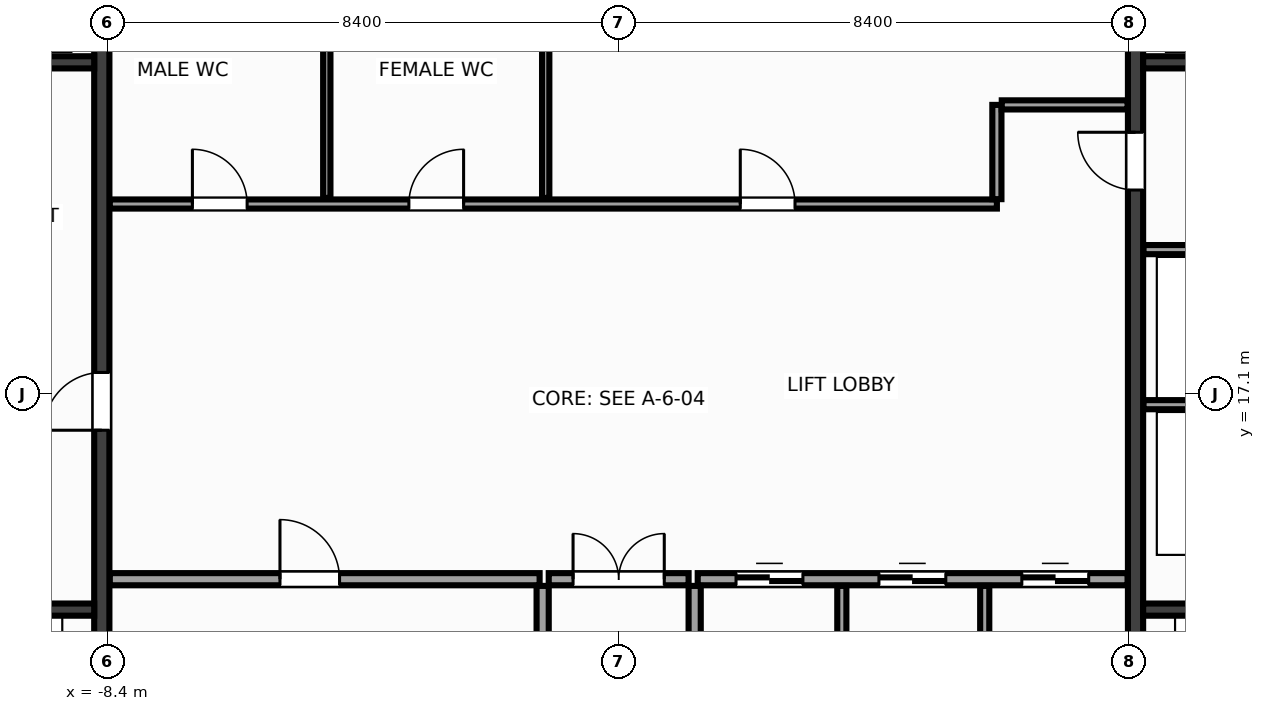
"""IFC4 building model, lengths in metres.
Left out: names, types, materials, properties, quantities, classifications, styles, units other than length and angle.
Written with IfcOpenShell. Run it as: python <this file> out.ifc"""

import sys

from ifc_helpers import new_model, si_unit, direction, frame, frame_2d, origin, place, context, subcontext, project, spatial, rectangle, extrude, source, transform, mapped, element, fill, save


model = new_model("IFC4")
c1 = context("Model", 3, precision=1e-05, world=origin(), true_north=direction((0.0, 1.0)))
c2 = subcontext(c1, "Body", "Model", "MODEL_VIEW")
j1 = project(units=[si_unit("LENGTHUNIT", "METRE"), si_unit("PLANEANGLEUNIT", "RADIAN")], contexts=[c1])
p1 = place(None, origin())
s1 = spatial("IfcSite", under=j1, at=p1, CompositionType="ELEMENT")
p2 = place(p1, origin())
s2 = spatial("IfcBuilding", under=s1, at=p2, CompositionType="ELEMENT")
p3 = place(p2, frame((0.0, 0.0, 110.0)))
s3 = spatial("IfcBuildingStorey", under=s2, at=p3, CompositionType="ELEMENT", Elevation=110.0)
m1 = source(origin(), c2, "Body", "SweptSolid", [
    extrude(rectangle(XDim=12.95, YDim=0.25, at=frame_2d((6.475, 0.0))), origin(), (0.0, 0.0, 1.0), 3.6),
])
p4 = place(p3, frame((-8.5, 10.525, 0.0), z_axis=(0.0, 0.0, 1.0), x_axis=(0.0, 1.0, 0.0)))
e1 = element("IfcWall", 1, at=p4, inside=s3, PredefinedType="SHEAR", context=c2, shape_type="MappedRepresentation", body=[
    mapped(m1, transform((0.0, 0.0, 0.0), x_axis=(1.0, 0.0, 0.0), y_axis=(0.0, 1.0, 0.0), z_axis=(0.0, 0.0, 1.0), scale=1.0)),
])
p5 = place(p4, frame((5.975, 0.0, 0.0)))
e2 = element("IfcOpeningElement", 2, at=p5, cuts=e1, PredefinedType="OPENING", context=c2, shape_type="SweptSolid", body=[
    extrude(rectangle(XDim=0.95, YDim=2.15, at=frame_2d((0.475, 1.075))), frame((0.0, 0.137, 0.0), z_axis=(0.0, -1.0, 0.0), x_axis=(1.0, 0.0, 0.0)), (0.0, 0.0, 1.0), 0.274),
])
p6 = place(p3, frame((8.5, 10.525, 0.0), z_axis=(0.0, 0.0, 1.0), x_axis=(0.0, 1.0, 0.0)))
e3 = element("IfcWall", 3, at=p6, inside=s3, PredefinedType="SHEAR", context=c2, shape_type="MappedRepresentation", body=[
    mapped(m1, transform((0.0, 0.0, 0.0), x_axis=(1.0, 0.0, 0.0), y_axis=(0.0, 1.0, 0.0), z_axis=(0.0, 0.0, 1.0), scale=1.0)),
])
p7 = place(p6, frame((9.925, 0.0, 0.0)))
e4 = element("IfcOpeningElement", 4, at=p7, cuts=e3, PredefinedType="OPENING", context=c2, shape_type="SweptSolid", body=[
    extrude(rectangle(XDim=0.95, YDim=2.15, at=frame_2d((0.475, 1.075))), frame((0.0, 0.137, 0.0), z_axis=(0.0, -1.0, 0.0), x_axis=(1.0, 0.0, 0.0)), (0.0, 0.0, 1.0), 0.274),
])
m2 = source(origin(), c2, "Body", "SweptSolid", [
    extrude(rectangle(XDim=2.825, YDim=0.2, at=frame_2d((1.413, 0.0))), origin(), (0.0, 0.0, 1.0), 3.6),
])
for number, where, z_axis, x_axis in (
    (5, (-11.45, 13.55, 0.0), (0.0, 0.0, 1.0), (1.0, 0.0, 0.0)),
    (6, (8.625, 13.55, 0.0), (0.0, 0.0, 1.0), (1.0, 0.0, 0.0)),
):
    element("IfcWall", number, at=place(p3, frame(where, z_axis=z_axis, x_axis=x_axis)), inside=s3, PredefinedType="SHEAR", context=c2, shape_type="MappedRepresentation", body=[
        mapped(m2, transform((0.0, 0.0, 0.0), x_axis=(1.0, 0.0, 0.0), y_axis=(0.0, 1.0, 0.0), z_axis=(0.0, 0.0, 1.0), scale=1.0)),
    ])
m3 = source(origin(), c2, "Body", "SweptSolid", [
    extrude(rectangle(XDim=3.02, YDim=0.2, at=frame_2d((1.51, 0.0))), origin(), (0.0, 0.0, 1.0), 3.6),
])
for number, where, z_axis, x_axis in (
    (7, (-11.645, 22.55, 0.0), (0.0, 0.0, 1.0), (1.0, 0.0, 0.0)),
    (8, (8.625, 22.55, 0.0), (0.0, 0.0, 1.0), (1.0, 0.0, 0.0)),
):
    element("IfcWall", number, at=place(p3, frame(where, z_axis=z_axis, x_axis=x_axis)), inside=s3, PredefinedType="SHEAR", context=c2, shape_type="MappedRepresentation", body=[
        mapped(m3, transform((0.0, 0.0, 0.0), x_axis=(1.0, 0.0, 0.0), y_axis=(0.0, 1.0, 0.0), z_axis=(0.0, 0.0, 1.0), scale=1.0)),
    ])
m4 = source(origin(), c2, "Body", "SweptSolid", [
    extrude(rectangle(XDim=3.01, YDim=0.15, at=frame_2d((1.505, 0.0))), origin(), (0.0, 0.0, 1.0), 3.36),
])
for number, where, z_axis, x_axis in (
    (9, (8.63, 16.92, 0.0), (0.0, 0.0, 1.0), (1.0, 0.0, 0.0)),
    (10, (8.63, 19.47, 0.0), (0.0, 0.0, 1.0), (1.0, 0.0, 0.0)),
):
    element("IfcWall", number, at=place(p3, frame(where, z_axis=z_axis, x_axis=x_axis)), inside=s3, PredefinedType="PARTITIONING", context=c2, shape_type="MappedRepresentation", body=[
        mapped(m4, transform((0.0, 0.0, 0.0), x_axis=(1.0, 0.0, 0.0), y_axis=(0.0, 1.0, 0.0), z_axis=(0.0, 0.0, 1.0), scale=1.0)),
    ])
m5 = source(origin(), c2, "Body", "SweptSolid", [
    extrude(rectangle(XDim=7.07, YDim=0.2, at=frame_2d((3.535, 0.0))), origin(), (0.0, 0.0, 1.0), 3.36),
])
p8 = place(p3, frame((-8.37, 14.05, 0.0), z_axis=(0.0, 0.0, 1.0), x_axis=(1.0, 0.0, 0.0)))
e11 = element("IfcWall", 11, at=p8, inside=s3, PredefinedType="PARTITIONING", context=c2, shape_type="MappedRepresentation", body=[
    mapped(m5, transform((0.0, 0.0, 0.0), x_axis=(1.0, 0.0, 0.0), y_axis=(0.0, 1.0, 0.0), z_axis=(0.0, 0.0, 1.0), scale=1.0)),
])
p9 = place(p8, frame((2.8, 0.0, 0.0)))
e12 = element("IfcOpeningElement", 12, at=p9, cuts=e11, PredefinedType="OPENING", context=c2, shape_type="SweptSolid", body=[
    extrude(rectangle(XDim=0.98, YDim=2.15, at=frame_2d((0.49, 1.075))), frame((0.0, 0.112, 0.0), z_axis=(0.0, -1.0, 0.0), x_axis=(1.0, 0.0, 0.0)), (0.0, 0.0, 1.0), 0.224),
])
p10 = place(p3, frame((1.3, 14.05, 0.0), z_axis=(0.0, 0.0, 1.0), x_axis=(1.0, 0.0, 0.0)))
e13 = element("IfcWall", 13, at=p10, inside=s3, PredefinedType="PARTITIONING", context=c2, shape_type="MappedRepresentation", body=[
    mapped(m5, transform((0.0, 0.0, 0.0), x_axis=(1.0, 0.0, 0.0), y_axis=(0.0, 1.0, 0.0), z_axis=(0.0, 0.0, 1.0), scale=1.0)),
])
p11 = place(p10, frame((0.63, 0.0, 0.0)))
e14 = element("IfcOpeningElement", 14, at=p11, cuts=e13, PredefinedType="OPENING", context=c2, shape_type="SweptSolid", body=[
    extrude(rectangle(XDim=1.1, YDim=2.15, at=frame_2d((0.55, 1.075))), frame((0.0, 0.112, 0.0), z_axis=(0.0, -1.0, 0.0), x_axis=(1.0, 0.0, 0.0)), (0.0, 0.0, 1.0), 0.224),
])
p12 = place(p10, frame((2.98, 0.0, 0.0)))
e15 = element("IfcOpeningElement", 15, at=p12, cuts=e13, PredefinedType="OPENING", context=c2, shape_type="SweptSolid", body=[
    extrude(rectangle(XDim=1.1, YDim=2.15, at=frame_2d((0.55, 1.075))), frame((0.0, 0.112, 0.0), z_axis=(0.0, -1.0, 0.0), x_axis=(1.0, 0.0, 0.0)), (0.0, 0.0, 1.0), 0.224),
])
p13 = place(p10, frame((5.33, 0.0, 0.0)))
e16 = element("IfcOpeningElement", 16, at=p13, cuts=e13, PredefinedType="OPENING", context=c2, shape_type="SweptSolid", body=[
    extrude(rectangle(XDim=1.1, YDim=2.15, at=frame_2d((0.55, 1.075))), frame((0.0, 0.112, 0.0), z_axis=(0.0, -1.0, 0.0), x_axis=(1.0, 0.0, 0.0)), (0.0, 0.0, 1.0), 0.224),
])
m6 = source(origin(), c2, "Body", "SweptSolid", [
    extrude(rectangle(XDim=3.415, YDim=0.2, at=frame_2d((1.708, 0.0))), origin(), (0.0, 0.0, 1.0), 3.36),
])
for number, where, z_axis, x_axis in (
    (17, (-1.25, 10.525, 0.0), (0.0, 0.0, 1.0), (0.0, 1.0, 0.0)),
    (18, (1.25, 10.525, 0.0), (0.0, 0.0, 1.0), (0.0, 1.0, 0.0)),
):
    element("IfcWall", number, at=place(p3, frame(where, z_axis=z_axis, x_axis=x_axis)), inside=s3, PredefinedType="PARTITIONING", context=c2, shape_type="MappedRepresentation", body=[
        mapped(m6, transform((0.0, 0.0, 0.0), x_axis=(1.0, 0.0, 0.0), y_axis=(0.0, 1.0, 0.0), z_axis=(0.0, 0.0, 1.0), scale=1.0)),
    ])
m7 = source(origin(), c2, "Body", "SweptSolid", [
    extrude(rectangle(XDim=2.3, YDim=0.2, at=frame_2d((1.15, 0.0))), origin(), (0.0, 0.0, 1.0), 3.36),
])
p14 = place(p3, frame((-1.15, 14.05, 0.0), z_axis=(0.0, 0.0, 1.0), x_axis=(1.0, 0.0, 0.0)))
e19 = element("IfcWall", 19, at=p14, inside=s3, PredefinedType="PARTITIONING", context=c2, shape_type="MappedRepresentation", body=[
    mapped(m7, transform((0.0, 0.0, 0.0), x_axis=(1.0, 0.0, 0.0), y_axis=(0.0, 1.0, 0.0), z_axis=(0.0, 0.0, 1.0), scale=1.0)),
])
p15 = place(p14, frame((0.4, 0.0, 0.0)))
e20 = element("IfcOpeningElement", 20, at=p15, cuts=e19, PredefinedType="OPENING", context=c2, shape_type="SweptSolid", body=[
    extrude(rectangle(XDim=1.5, YDim=2.2, at=frame_2d((0.75, 1.1))), frame((0.0, 0.112, 0.0), z_axis=(0.0, -1.0, 0.0), x_axis=(1.0, 0.0, 0.0)), (0.0, 0.0, 1.0), 0.224),
])
m8 = source(origin(), c2, "Body", "SweptSolid", [
    extrude(rectangle(XDim=14.59, YDim=0.15, at=frame_2d((7.295, 0.0))), origin(), (0.0, 0.0, 1.0), 3.36),
])
p16 = place(p3, frame((-8.37, 20.22, 0.0), z_axis=(0.0, 0.0, 1.0), x_axis=(1.0, 0.0, 0.0)))
e21 = element("IfcWall", 21, at=p16, inside=s3, PredefinedType="PARTITIONING", context=c2, shape_type="MappedRepresentation", body=[
    mapped(m8, transform((0.0, 0.0, 0.0), x_axis=(1.0, 0.0, 0.0), y_axis=(0.0, 1.0, 0.0), z_axis=(0.0, 0.0, 1.0), scale=1.0)),
])
p17 = place(p16, frame((1.36, 0.0, 0.0)))
e22 = element("IfcOpeningElement", 22, at=p17, cuts=e21, PredefinedType="OPENING", context=c2, shape_type="SweptSolid", body=[
    extrude(rectangle(XDim=0.9, YDim=2.15, at=frame_2d((0.45, 1.075))), frame((0.0, 0.087, 0.0), z_axis=(0.0, -1.0, 0.0), x_axis=(1.0, 0.0, 0.0)), (0.0, 0.0, 1.0), 0.174),
])
p18 = place(p16, frame((4.92, 0.0, 0.0)))
e23 = element("IfcOpeningElement", 23, at=p18, cuts=e21, PredefinedType="OPENING", context=c2, shape_type="SweptSolid", body=[
    extrude(rectangle(XDim=0.9, YDim=2.15, at=frame_2d((0.45, 1.075))), frame((0.0, 0.087, 0.0), z_axis=(0.0, -1.0, 0.0), x_axis=(1.0, 0.0, 0.0)), (0.0, 0.0, 1.0), 0.174),
])
p19 = place(p16, frame((10.37, 0.0, 0.0)))
e24 = element("IfcOpeningElement", 24, at=p19, cuts=e21, PredefinedType="OPENING", context=c2, shape_type="SweptSolid", body=[
    extrude(rectangle(XDim=0.9, YDim=2.15, at=frame_2d((0.45, 1.075))), frame((0.0, 0.087, 0.0), z_axis=(0.0, -1.0, 0.0), x_axis=(1.0, 0.0, 0.0)), (0.0, 0.0, 1.0), 0.174),
])
m9 = source(origin(), c2, "Body", "SweptSolid", [
    extrude(rectangle(XDim=1.55, YDim=0.15, at=frame_2d((0.775, 0.0))), origin(), (0.0, 0.0, 1.0), 3.36),
])
p20 = place(p3, frame((6.22, 20.3, 0.0), z_axis=(0.0, 0.0, 1.0), x_axis=(0.0, 1.0, 0.0)))
e25 = element("IfcWall", 25, at=p20, inside=s3, PredefinedType="PARTITIONING", context=c2, shape_type="MappedRepresentation", body=[
    mapped(m9, transform((0.0, 0.0, 0.0), x_axis=(1.0, 0.0, 0.0), y_axis=(0.0, 1.0, 0.0), z_axis=(0.0, 0.0, 1.0), scale=1.0)),
])
m10 = source(origin(), c2, "Body", "SweptSolid", [
    extrude(rectangle(XDim=2.07, YDim=0.15, at=frame_2d((1.035, 0.0))), origin(), (0.0, 0.0, 1.0), 3.36),
])
p21 = place(p3, frame((6.3, 21.85, 0.0), z_axis=(0.0, 0.0, 1.0), x_axis=(1.0, 0.0, 0.0)))
e26 = element("IfcWall", 26, at=p21, inside=s3, PredefinedType="PARTITIONING", context=c2, shape_type="MappedRepresentation", body=[
    mapped(m10, transform((0.0, 0.0, 0.0), x_axis=(1.0, 0.0, 0.0), y_axis=(0.0, 1.0, 0.0), z_axis=(0.0, 0.0, 1.0), scale=1.0)),
])
m11 = source(origin(), c2, "Body", "SweptSolid", [
    extrude(rectangle(XDim=3.415, YDim=0.15, at=frame_2d((1.708, 0.0))), origin(), (0.0, 0.0, 1.0), 3.36),
])
for number, where, z_axis, x_axis in (
    (27, (3.67, 10.525, 0.0), (0.0, 0.0, 1.0), (0.0, 1.0, 0.0)),
    (28, (6.02, 10.525, 0.0), (0.0, 0.0, 1.0), (0.0, 1.0, 0.0)),
):
    element("IfcWall", number, at=place(p3, frame(where, z_axis=z_axis, x_axis=x_axis)), inside=s3, PredefinedType="PARTITIONING", context=c2, shape_type="MappedRepresentation", body=[
        mapped(m11, transform((0.0, 0.0, 0.0), x_axis=(1.0, 0.0, 0.0), y_axis=(0.0, 1.0, 0.0), z_axis=(0.0, 0.0, 1.0), scale=1.0)),
    ])
m12 = source(origin(), c2, "Body", "SweptSolid", [
    extrude(rectangle(XDim=3.115, YDim=0.12, at=frame_2d((1.558, 0.0))), origin(), (0.0, 0.0, 1.0), 3.36),
])
for number, where, z_axis, x_axis in (
    (29, (-4.8, 20.32, 0.0), (0.0, 0.0, 1.0), (0.0, 1.0, 0.0)),
    (30, (-1.2, 20.32, 0.0), (0.0, 0.0, 1.0), (0.0, 1.0, 0.0)),
):
    element("IfcWall", number, at=place(p3, frame(where, z_axis=z_axis, x_axis=x_axis)), inside=s3, PredefinedType="PARTITIONING", context=c2, shape_type="MappedRepresentation", body=[
        mapped(m12, transform((0.0, 0.0, 0.0), x_axis=(1.0, 0.0, 0.0), y_axis=(0.0, 1.0, 0.0), z_axis=(0.0, 0.0, 1.0), scale=1.0)),
    ])
m13 = source(origin(), c2, "Body", "SweptSolid", [
    extrude(rectangle(XDim=0.95, YDim=2.15, at=frame_2d((0.475, 1.075))), frame((0.0, 0.025, 0.0), z_axis=(0.0, -1.0, 0.0), x_axis=(1.0, 0.0, 0.0)), (0.0, 0.0, 1.0), 0.05),
])
p22 = place(p5, origin())
e31 = element("IfcDoor", 31, at=p22, inside=s3, OperationType="SINGLE_SWING_LEFT", PredefinedType="DOOR", context=c2, shape_type="MappedRepresentation", body=[
    mapped(m13, transform((0.0, 0.0, 0.0), x_axis=(1.0, 0.0, 0.0), y_axis=(0.0, 1.0, 0.0), z_axis=(0.0, 0.0, 1.0), scale=1.0)),
])
fill(e2, e31)
m14 = source(origin(), c2, "Body", "SweptSolid", [
    extrude(rectangle(XDim=0.95, YDim=2.15, at=frame_2d((0.475, 1.075))), frame((0.0, 0.025, 0.0), z_axis=(0.0, -1.0, 0.0), x_axis=(1.0, 0.0, 0.0)), (0.0, 0.0, 1.0), 0.05),
])
p23 = place(p7, origin())
e32 = element("IfcDoor", 32, at=p23, inside=s3, OperationType="SINGLE_SWING_RIGHT", PredefinedType="DOOR", context=c2, shape_type="MappedRepresentation", body=[
    mapped(m14, transform((0.0, 0.0, 0.0), x_axis=(1.0, 0.0, 0.0), y_axis=(0.0, 1.0, 0.0), z_axis=(0.0, 0.0, 1.0), scale=1.0)),
])
fill(e4, e32)
m15 = source(origin(), c2, "Body", "SweptSolid", [
    extrude(rectangle(XDim=0.98, YDim=2.15, at=frame_2d((0.49, 1.075))), frame((0.0, 0.025, 0.0), z_axis=(0.0, -1.0, 0.0), x_axis=(1.0, 0.0, 0.0)), (0.0, 0.0, 1.0), 0.05),
])
p24 = place(p9, origin())
e33 = element("IfcDoor", 33, at=p24, inside=s3, OperationType="SINGLE_SWING_LEFT", PredefinedType="DOOR", context=c2, shape_type="MappedRepresentation", body=[
    mapped(m15, transform((0.0, 0.0, 0.0), x_axis=(1.0, 0.0, 0.0), y_axis=(0.0, 1.0, 0.0), z_axis=(0.0, 0.0, 1.0), scale=1.0)),
])
fill(e12, e33)
m16 = source(origin(), c2, "Body", "SweptSolid", [
    extrude(rectangle(XDim=1.1, YDim=2.15, at=frame_2d((0.55, 1.075))), frame((0.0, 0.025, 0.0), z_axis=(0.0, -1.0, 0.0), x_axis=(1.0, 0.0, 0.0)), (0.0, 0.0, 1.0), 0.05),
])
p25 = place(p11, origin())
e34 = element("IfcDoor", 34, at=p25, inside=s3, OperationType="DOUBLE_DOOR_SLIDING", PredefinedType="DOOR", context=c2, shape_type="MappedRepresentation", body=[
    mapped(m16, transform((0.0, 0.0, 0.0), x_axis=(1.0, 0.0, 0.0), y_axis=(0.0, 1.0, 0.0), z_axis=(0.0, 0.0, 1.0), scale=1.0)),
])
fill(e14, e34)
p26 = place(p12, origin())
e35 = element("IfcDoor", 35, at=p26, inside=s3, OperationType="DOUBLE_DOOR_SLIDING", PredefinedType="DOOR", context=c2, shape_type="MappedRepresentation", body=[
    mapped(m16, transform((0.0, 0.0, 0.0), x_axis=(1.0, 0.0, 0.0), y_axis=(0.0, 1.0, 0.0), z_axis=(0.0, 0.0, 1.0), scale=1.0)),
])
fill(e15, e35)
p27 = place(p13, origin())
e36 = element("IfcDoor", 36, at=p27, inside=s3, OperationType="DOUBLE_DOOR_SLIDING", PredefinedType="DOOR", context=c2, shape_type="MappedRepresentation", body=[
    mapped(m16, transform((0.0, 0.0, 0.0), x_axis=(1.0, 0.0, 0.0), y_axis=(0.0, 1.0, 0.0), z_axis=(0.0, 0.0, 1.0), scale=1.0)),
])
fill(e16, e36)
m17 = source(origin(), c2, "Body", "SweptSolid", [
    extrude(rectangle(XDim=1.5, YDim=2.2, at=frame_2d((0.75, 1.1))), frame((0.0, 0.025, 0.0), z_axis=(0.0, -1.0, 0.0), x_axis=(1.0, 0.0, 0.0)), (0.0, 0.0, 1.0), 0.05),
])
p28 = place(p15, origin())
e37 = element("IfcDoor", 37, at=p28, inside=s3, OperationType="DOUBLE_DOOR_SINGLE_SWING", PredefinedType="DOOR", context=c2, shape_type="MappedRepresentation", body=[
    mapped(m17, transform((0.0, 0.0, 0.0), x_axis=(1.0, 0.0, 0.0), y_axis=(0.0, 1.0, 0.0), z_axis=(0.0, 0.0, 1.0), scale=1.0)),
])
fill(e20, e37)
m18 = source(origin(), c2, "Body", "SweptSolid", [
    extrude(rectangle(XDim=0.9, YDim=2.15, at=frame_2d((0.45, 1.075))), frame((0.0, 0.025, 0.0), z_axis=(0.0, -1.0, 0.0), x_axis=(1.0, 0.0, 0.0)), (0.0, 0.0, 1.0), 0.05),
])
p29 = place(p17, origin())
e38 = element("IfcDoor", 38, at=p29, inside=s3, OperationType="SINGLE_SWING_LEFT", PredefinedType="DOOR", context=c2, shape_type="MappedRepresentation", body=[
    mapped(m18, transform((0.0, 0.0, 0.0), x_axis=(1.0, 0.0, 0.0), y_axis=(0.0, 1.0, 0.0), z_axis=(0.0, 0.0, 1.0), scale=1.0)),
])
fill(e22, e38)
p30 = place(p18, origin())
e39 = element("IfcDoor", 39, at=p30, inside=s3, OperationType="SINGLE_SWING_RIGHT", PredefinedType="DOOR", context=c2, shape_type="MappedRepresentation", body=[
    mapped(m18, transform((0.0, 0.0, 0.0), x_axis=(1.0, 0.0, 0.0), y_axis=(0.0, 1.0, 0.0), z_axis=(0.0, 0.0, 1.0), scale=1.0)),
])
fill(e23, e39)
p31 = place(p19, origin())
e40 = element("IfcDoor", 40, at=p31, inside=s3, OperationType="SINGLE_SWING_LEFT", PredefinedType="DOOR", context=c2, shape_type="MappedRepresentation", body=[
    mapped(m18, transform((0.0, 0.0, 0.0), x_axis=(1.0, 0.0, 0.0), y_axis=(0.0, 1.0, 0.0), z_axis=(0.0, 0.0, 1.0), scale=1.0)),
])
fill(e24, e40)
save(model, sys.argv[1])
